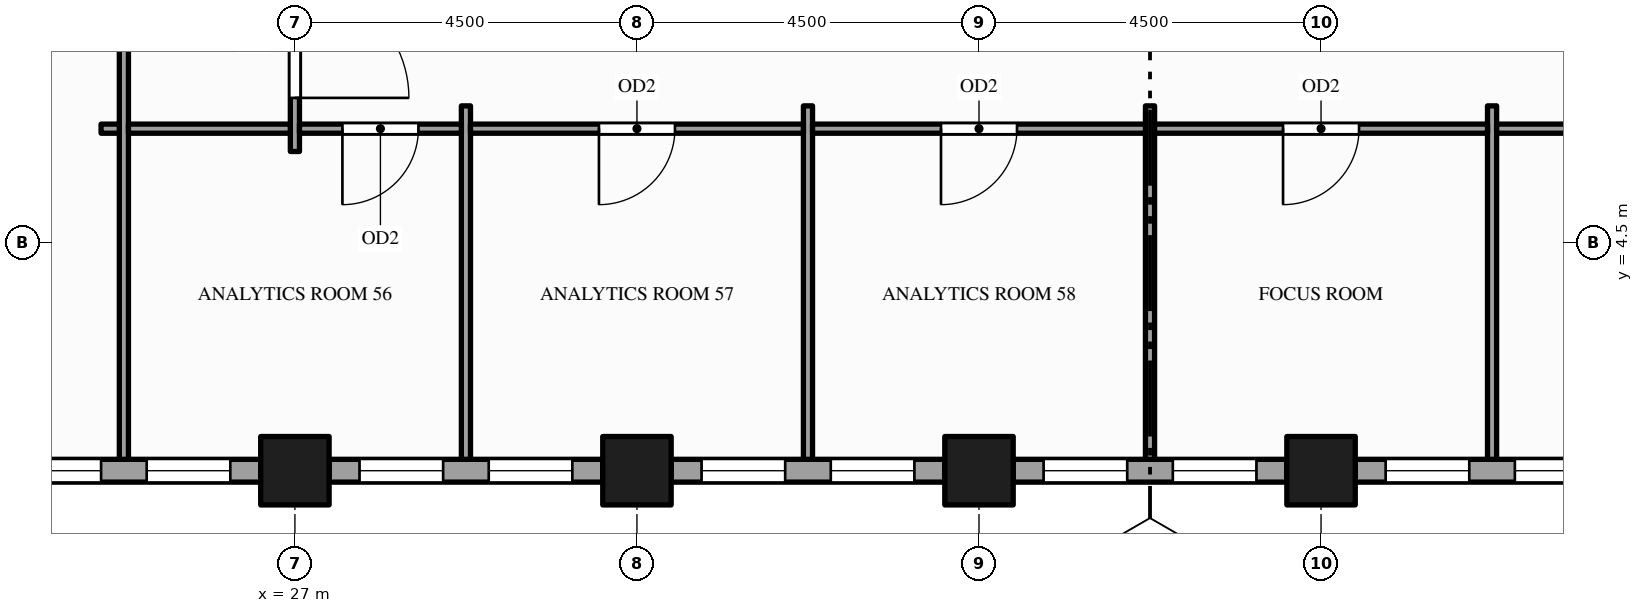
"""IFC4 building model, lengths in metres.
Left out: names, types, materials, properties, quantities, classifications, styles, units other than length and angle.
Written with IfcOpenShell. Run it as: python <this file> out.ifc"""

import sys

from ifc_helpers import new_model, si_unit, direction, frame, frame_2d, origin, origin_2d, place, context, subcontext, project, spatial, rectangle, hollow_rectangle, extrude, element, fill, save


model = new_model("IFC4")
c1 = context("Model", 3, precision=1e-05, world=origin(), true_north=direction((0.0, 1.0)))
c2 = subcontext(c1, "Body", "Model", "MODEL_VIEW")
j1 = project(units=[si_unit("LENGTHUNIT", "METRE"), si_unit("PLANEANGLEUNIT", "RADIAN")], contexts=[c1])
p1 = place(None, origin())
s1 = spatial("IfcSite", under=j1, at=p1, CompositionType="ELEMENT")
p2 = place(p1, origin())
s2 = spatial("IfcBuilding", under=s1, at=p2, CompositionType="ELEMENT")
p3 = place(p2, frame((0.0, 0.0, 159.0)))
s3 = spatial("IfcBuildingStorey", under=s2, at=p3, CompositionType="ELEMENT", Elevation=159.0)
for number, where, z_axis, x_axis in (
    (1, (27.0, 1.5, -0.15), (0.0, 0.0, 1.0), (1.0, 0.0, 0.0)),
    (2, (31.5, 1.5, -0.15), (0.0, 0.0, 1.0), (1.0, 0.0, 0.0)),
    (3, (36.0, 1.5, -0.15), (0.0, 0.0, 1.0), (1.0, 0.0, 0.0)),
    (4, (40.5, 1.5, -0.15), (0.0, 0.0, 1.0), (1.0, 0.0, 0.0)),
):
    element("IfcColumn", number, at=place(p3, frame(where, z_axis=z_axis, x_axis=x_axis)), inside=s3, PredefinedType="COLUMN", context=c2, shape_type="SweptSolid", body=[
        extrude(hollow_rectangle(XDim=0.9, YDim=0.9, WallThickness=0.045, at=origin_2d()), origin(), (0.0, 0.0, 1.0), 4.0),
    ])
p4 = place(p3, frame((22.95, 1.5, 0.0), z_axis=(0.0, 0.0, 1.0), x_axis=(1.0, 0.0, 0.0)))
e5 = element("IfcWall", 5, at=p4, inside=s3, PredefinedType="STANDARD", context=c2, shape_type="SweptSolid", body=[
    extrude(rectangle(XDim=3.6, YDim=0.3, at=frame_2d((1.8, 0.0))), origin(), (0.0, 0.0, 1.0), 2.87),
])
p5 = place(p4, frame((0.4, 0.0, 0.9)))
e6 = element("IfcOpeningElement", 6, at=p5, cuts=e5, PredefinedType="OPENING", context=c2, shape_type="SweptSolid", body=[
    extrude(rectangle(XDim=1.1, YDim=1.75, at=frame_2d((0.55, 0.875))), frame((0.0, 0.16, 0.0), z_axis=(0.0, -1.0, 0.0), x_axis=(1.0, 0.0, 0.0)), (0.0, 0.0, 1.0), 0.32),
])
p6 = place(p4, frame((2.1, 0.0, 0.9)))
e7 = element("IfcOpeningElement", 7, at=p6, cuts=e5, PredefinedType="OPENING", context=c2, shape_type="SweptSolid", body=[
    extrude(rectangle(XDim=1.1, YDim=1.75, at=frame_2d((0.55, 0.875))), frame((0.0, 0.16, 0.0), z_axis=(0.0, -1.0, 0.0), x_axis=(1.0, 0.0, 0.0)), (0.0, 0.0, 1.0), 0.32),
])
p7 = place(p3, frame((27.45, 1.5, 0.0), z_axis=(0.0, 0.0, 1.0), x_axis=(1.0, 0.0, 0.0)))
e8 = element("IfcWall", 8, at=p7, inside=s3, PredefinedType="STANDARD", context=c2, shape_type="SweptSolid", body=[
    extrude(rectangle(XDim=3.6, YDim=0.3, at=frame_2d((1.8, 0.0))), origin(), (0.0, 0.0, 1.0), 2.87),
])
p8 = place(p7, frame((0.4, 0.0, 0.9)))
e9 = element("IfcOpeningElement", 9, at=p8, cuts=e8, PredefinedType="OPENING", context=c2, shape_type="SweptSolid", body=[
    extrude(rectangle(XDim=1.1, YDim=1.75, at=frame_2d((0.55, 0.875))), frame((0.0, 0.16, 0.0), z_axis=(0.0, -1.0, 0.0), x_axis=(1.0, 0.0, 0.0)), (0.0, 0.0, 1.0), 0.32),
])
p9 = place(p7, frame((2.1, 0.0, 0.9)))
e10 = element("IfcOpeningElement", 10, at=p9, cuts=e8, PredefinedType="OPENING", context=c2, shape_type="SweptSolid", body=[
    extrude(rectangle(XDim=1.1, YDim=1.75, at=frame_2d((0.55, 0.875))), frame((0.0, 0.16, 0.0), z_axis=(0.0, -1.0, 0.0), x_axis=(1.0, 0.0, 0.0)), (0.0, 0.0, 1.0), 0.32),
])
p10 = place(p3, frame((31.95, 1.5, 0.0), z_axis=(0.0, 0.0, 1.0), x_axis=(1.0, 0.0, 0.0)))
e11 = element("IfcWall", 11, at=p10, inside=s3, PredefinedType="STANDARD", context=c2, shape_type="SweptSolid", body=[
    extrude(rectangle(XDim=3.6, YDim=0.3, at=frame_2d((1.8, 0.0))), origin(), (0.0, 0.0, 1.0), 2.87),
])
p11 = place(p10, frame((0.4, 0.0, 0.9)))
e12 = element("IfcOpeningElement", 12, at=p11, cuts=e11, PredefinedType="OPENING", context=c2, shape_type="SweptSolid", body=[
    extrude(rectangle(XDim=1.1, YDim=1.75, at=frame_2d((0.55, 0.875))), frame((0.0, 0.16, 0.0), z_axis=(0.0, -1.0, 0.0), x_axis=(1.0, 0.0, 0.0)), (0.0, 0.0, 1.0), 0.32),
])
p12 = place(p10, frame((2.1, 0.0, 0.9)))
e13 = element("IfcOpeningElement", 13, at=p12, cuts=e11, PredefinedType="OPENING", context=c2, shape_type="SweptSolid", body=[
    extrude(rectangle(XDim=1.1, YDim=1.75, at=frame_2d((0.55, 0.875))), frame((0.0, 0.16, 0.0), z_axis=(0.0, -1.0, 0.0), x_axis=(1.0, 0.0, 0.0)), (0.0, 0.0, 1.0), 0.32),
])
p13 = place(p3, frame((36.45, 1.5, 0.0), z_axis=(0.0, 0.0, 1.0), x_axis=(1.0, 0.0, 0.0)))
e14 = element("IfcWall", 14, at=p13, inside=s3, PredefinedType="STANDARD", context=c2, shape_type="SweptSolid", body=[
    extrude(rectangle(XDim=3.6, YDim=0.3, at=frame_2d((1.8, 0.0))), origin(), (0.0, 0.0, 1.0), 2.87),
])
p14 = place(p13, frame((0.4, 0.0, 0.9)))
e15 = element("IfcOpeningElement", 15, at=p14, cuts=e14, PredefinedType="OPENING", context=c2, shape_type="SweptSolid", body=[
    extrude(rectangle(XDim=1.1, YDim=1.75, at=frame_2d((0.55, 0.875))), frame((0.0, 0.16, 0.0), z_axis=(0.0, -1.0, 0.0), x_axis=(1.0, 0.0, 0.0)), (0.0, 0.0, 1.0), 0.32),
])
p15 = place(p13, frame((2.1, 0.0, 0.9)))
e16 = element("IfcOpeningElement", 16, at=p15, cuts=e14, PredefinedType="OPENING", context=c2, shape_type="SweptSolid", body=[
    extrude(rectangle(XDim=1.1, YDim=1.75, at=frame_2d((0.55, 0.875))), frame((0.0, 0.16, 0.0), z_axis=(0.0, -1.0, 0.0), x_axis=(1.0, 0.0, 0.0)), (0.0, 0.0, 1.0), 0.32),
])
p16 = place(p3, frame((40.95, 1.5, 0.0), z_axis=(0.0, 0.0, 1.0), x_axis=(1.0, 0.0, 0.0)))
e17 = element("IfcWall", 17, at=p16, inside=s3, PredefinedType="STANDARD", context=c2, shape_type="SweptSolid", body=[
    extrude(rectangle(XDim=3.6, YDim=0.3, at=frame_2d((1.8, 0.0))), origin(), (0.0, 0.0, 1.0), 2.87),
])
p17 = place(p16, frame((0.4, 0.0, 0.9)))
e18 = element("IfcOpeningElement", 18, at=p17, cuts=e17, PredefinedType="OPENING", context=c2, shape_type="SweptSolid", body=[
    extrude(rectangle(XDim=1.1, YDim=1.75, at=frame_2d((0.55, 0.875))), frame((0.0, 0.16, 0.0), z_axis=(0.0, -1.0, 0.0), x_axis=(1.0, 0.0, 0.0)), (0.0, 0.0, 1.0), 0.32),
])
p18 = place(p16, frame((2.1, 0.0, 0.9)))
e19 = element("IfcOpeningElement", 19, at=p18, cuts=e17, PredefinedType="OPENING", context=c2, shape_type="SweptSolid", body=[
    extrude(rectangle(XDim=1.1, YDim=1.75, at=frame_2d((0.55, 0.875))), frame((0.0, 0.16, 0.0), z_axis=(0.0, -1.0, 0.0), x_axis=(1.0, 0.0, 0.0)), (0.0, 0.0, 1.0), 0.32),
])
p19 = place(p3, frame((24.75, 1.65, 0.0), z_axis=(0.0, 0.0, 1.0), x_axis=(0.0, 1.0, 0.0)))
e20 = element("IfcWall", 20, at=p19, inside=s3, PredefinedType="PARTITIONING", context=c2, shape_type="SweptSolid", body=[
    extrude(rectangle(XDim=22.298, YDim=0.12, at=frame_2d((11.149, 0.0))), origin(), (0.0, 0.0, 1.0), 2.87),
])
p20 = place(p19, frame((7.725, 0.0, 0.0)))
e21 = element("IfcOpeningElement", 21, at=p20, cuts=e20, PredefinedType="OPENING", context=c2, shape_type="SweptSolid", body=[
    extrude(rectangle(XDim=1.5, YDim=2.1, at=frame_2d((0.75, 1.05))), frame((0.0, 0.07, 0.0), z_axis=(0.0, -1.0, 0.0), x_axis=(1.0, 0.0, 0.0)), (0.0, 0.0, 1.0), 0.14),
])
p21 = place(p19, frame((13.125, 0.0, 0.0)))
e22 = element("IfcOpeningElement", 22, at=p21, cuts=e20, PredefinedType="OPENING", context=c2, shape_type="SweptSolid", body=[
    extrude(rectangle(XDim=1.2, YDim=2.1, at=frame_2d((0.6, 1.05))), frame((0.0, 0.07, 0.0), z_axis=(0.0, -1.0, 0.0), x_axis=(1.0, 0.0, 0.0)), (0.0, 0.0, 1.0), 0.14),
])
p22 = place(p3, frame((27.0, 5.7, 0.0), z_axis=(0.0, 0.0, 1.0), x_axis=(0.0, 1.0, 0.0)))
e23 = element("IfcWall", 23, at=p22, inside=s3, PredefinedType="PARTITIONING", context=c2, shape_type="SweptSolid", body=[
    extrude(rectangle(XDim=14.1, YDim=0.12, at=frame_2d((7.05, 0.0))), origin(), (0.0, 0.0, 1.0), 2.87),
])
p23 = place(p22, frame((0.705, 0.0, 0.0)))
e24 = element("IfcOpeningElement", 24, at=p23, cuts=e23, PredefinedType="OPENING", context=c2, shape_type="SweptSolid", body=[
    extrude(rectangle(XDim=1.5, YDim=2.1, at=frame_2d((0.75, 1.05))), frame((0.0, 0.07, 0.0), z_axis=(0.0, -1.0, 0.0), x_axis=(1.0, 0.0, 0.0)), (0.0, 0.0, 1.0), 0.14),
])
p24 = place(p22, frame((11.895, 0.0, 0.0)))
e25 = element("IfcOpeningElement", 25, at=p24, cuts=e23, PredefinedType="OPENING", context=c2, shape_type="SweptSolid", body=[
    extrude(rectangle(XDim=1.5, YDim=2.1, at=frame_2d((0.75, 1.05))), frame((0.0, 0.07, 0.0), z_axis=(0.0, -1.0, 0.0), x_axis=(1.0, 0.0, 0.0)), (0.0, 0.0, 1.0), 0.14),
])
for number, where, z_axis, x_axis in (
    (26, (29.25, 1.65, 0.0), (0.0, 0.0, 1.0), (0.0, 1.0, 0.0)),
    (27, (33.75, 1.65, 0.0), (0.0, 0.0, 1.0), (0.0, 1.0, 0.0)),
    (28, (38.25, 1.65, 0.0), (0.0, 0.0, 1.0), (0.0, 1.0, 0.0)),
    (29, (42.75, 1.65, 0.0), (0.0, 0.0, 1.0), (0.0, 1.0, 0.0)),
):
    element("IfcWall", number, at=place(p3, frame(where, z_axis=z_axis, x_axis=x_axis)), inside=s3, PredefinedType="PARTITIONING", context=c2, shape_type="SweptSolid", body=[
        extrude(rectangle(XDim=4.65, YDim=0.12, at=frame_2d((2.325, 0.0))), origin(), (0.0, 0.0, 1.0), 2.87),
    ])
p25 = place(p3, frame((24.45, 6.0, 0.0), z_axis=(0.0, 0.0, 1.0), x_axis=(1.0, 0.0, 0.0)))
e30 = element("IfcWall", 30, at=p25, inside=s3, PredefinedType="PARTITIONING", context=c2, shape_type="SweptSolid", body=[
    extrude(rectangle(XDim=0.24, YDim=0.12, at=frame_2d((0.12, 0.0))), origin(), (0.0, 0.0, 1.0), 2.87),
])
p26 = place(p3, frame((24.81, 6.0, 0.0), z_axis=(0.0, 0.0, 1.0), x_axis=(1.0, 0.0, 0.0)))
e31 = element("IfcWall", 31, at=p26, inside=s3, PredefinedType="PARTITIONING", context=c2, shape_type="SweptSolid", body=[
    extrude(rectangle(XDim=2.13, YDim=0.12, at=frame_2d((1.065, 0.0))), origin(), (0.0, 0.0, 1.0), 2.87),
])
p27 = place(p3, frame((27.06, 6.0, 0.0), z_axis=(0.0, 0.0, 1.0), x_axis=(1.0, 0.0, 0.0)))
e32 = element("IfcWall", 32, at=p27, inside=s3, PredefinedType="PARTITIONING", context=c2, shape_type="SweptSolid", body=[
    extrude(rectangle(XDim=2.13, YDim=0.12, at=frame_2d((1.065, 0.0))), origin(), (0.0, 0.0, 1.0), 2.87),
])
p28 = place(p27, frame((0.565, 0.0, 0.0)))
e33 = element("IfcOpeningElement", 33, at=p28, cuts=e32, PredefinedType="OPENING", context=c2, shape_type="SweptSolid", body=[
    extrude(rectangle(XDim=1.0, YDim=2.1, at=frame_2d((0.5, 1.05))), frame((0.0, 0.07, 0.0), z_axis=(0.0, -1.0, 0.0), x_axis=(1.0, 0.0, 0.0)), (0.0, 0.0, 1.0), 0.14),
])
p29 = place(p3, frame((29.31, 6.0, 0.0), z_axis=(0.0, 0.0, 1.0), x_axis=(1.0, 0.0, 0.0)))
e34 = element("IfcWall", 34, at=p29, inside=s3, PredefinedType="PARTITIONING", context=c2, shape_type="SweptSolid", body=[
    extrude(rectangle(XDim=4.38, YDim=0.12, at=frame_2d((2.19, 0.0))), origin(), (0.0, 0.0, 1.0), 2.87),
])
p30 = place(p29, frame((1.69, 0.0, 0.0)))
e35 = element("IfcOpeningElement", 35, at=p30, cuts=e34, PredefinedType="OPENING", context=c2, shape_type="SweptSolid", body=[
    extrude(rectangle(XDim=1.0, YDim=2.1, at=frame_2d((0.5, 1.05))), frame((0.0, 0.07, 0.0), z_axis=(0.0, -1.0, 0.0), x_axis=(1.0, 0.0, 0.0)), (0.0, 0.0, 1.0), 0.14),
])
p31 = place(p3, frame((33.81, 6.0, 0.0), z_axis=(0.0, 0.0, 1.0), x_axis=(1.0, 0.0, 0.0)))
e36 = element("IfcWall", 36, at=p31, inside=s3, PredefinedType="PARTITIONING", context=c2, shape_type="SweptSolid", body=[
    extrude(rectangle(XDim=4.38, YDim=0.12, at=frame_2d((2.19, 0.0))), origin(), (0.0, 0.0, 1.0), 2.87),
])
p32 = place(p31, frame((1.69, 0.0, 0.0)))
e37 = element("IfcOpeningElement", 37, at=p32, cuts=e36, PredefinedType="OPENING", context=c2, shape_type="SweptSolid", body=[
    extrude(rectangle(XDim=1.0, YDim=2.1, at=frame_2d((0.5, 1.05))), frame((0.0, 0.07, 0.0), z_axis=(0.0, -1.0, 0.0), x_axis=(1.0, 0.0, 0.0)), (0.0, 0.0, 1.0), 0.14),
])
p33 = place(p3, frame((38.31, 6.0, 0.0), z_axis=(0.0, 0.0, 1.0), x_axis=(1.0, 0.0, 0.0)))
e38 = element("IfcWall", 38, at=p33, inside=s3, PredefinedType="PARTITIONING", context=c2, shape_type="SweptSolid", body=[
    extrude(rectangle(XDim=4.38, YDim=0.12, at=frame_2d((2.19, 0.0))), origin(), (0.0, 0.0, 1.0), 2.87),
])
p34 = place(p33, frame((1.69, 0.0, 0.0)))
e39 = element("IfcOpeningElement", 39, at=p34, cuts=e38, PredefinedType="OPENING", context=c2, shape_type="SweptSolid", body=[
    extrude(rectangle(XDim=1.0, YDim=2.1, at=frame_2d((0.5, 1.05))), frame((0.0, 0.07, 0.0), z_axis=(0.0, -1.0, 0.0), x_axis=(1.0, 0.0, 0.0)), (0.0, 0.0, 1.0), 0.14),
])
p35 = place(p3, frame((42.81, 6.0, 0.0), z_axis=(0.0, 0.0, 1.0), x_axis=(1.0, 0.0, 0.0)))
e40 = element("IfcWall", 40, at=p35, inside=s3, PredefinedType="PARTITIONING", context=c2, shape_type="SweptSolid", body=[
    extrude(rectangle(XDim=6.63, YDim=0.12, at=frame_2d((3.315, 0.0))), origin(), (0.0, 0.0, 1.0), 2.87),
])
p36 = place(p35, frame((2.715, 0.0, 0.0)))
e41 = element("IfcOpeningElement", 41, at=p36, cuts=e40, PredefinedType="OPENING", context=c2, shape_type="SweptSolid", body=[
    extrude(rectangle(XDim=1.2, YDim=2.1, at=frame_2d((0.6, 1.05))), frame((0.0, 0.07, 0.0), z_axis=(0.0, -1.0, 0.0), x_axis=(1.0, 0.0, 0.0)), (0.0, 0.0, 1.0), 0.14),
])
p37 = place(p5, origin())
e42 = element("IfcWindow", 42, at=p37, inside=s3, PartitioningType="SINGLE_PANEL", PredefinedType="WINDOW", context=c2, shape_type="SweptSolid", body=[
    extrude(rectangle(XDim=1.1, YDim=1.75, at=frame_2d((0.55, 0.875))), frame((0.0, 0.03, 0.0), z_axis=(0.0, -1.0, 0.0), x_axis=(1.0, 0.0, 0.0)), (0.0, 0.0, 1.0), 0.06),
])
fill(e6, e42)
p38 = place(p6, origin())
e43 = element("IfcWindow", 43, at=p38, inside=s3, PartitioningType="SINGLE_PANEL", PredefinedType="WINDOW", context=c2, shape_type="SweptSolid", body=[
    extrude(rectangle(XDim=1.1, YDim=1.75, at=frame_2d((0.55, 0.875))), frame((0.0, 0.03, 0.0), z_axis=(0.0, -1.0, 0.0), x_axis=(1.0, 0.0, 0.0)), (0.0, 0.0, 1.0), 0.06),
])
fill(e7, e43)
p39 = place(p8, origin())
e44 = element("IfcWindow", 44, at=p39, inside=s3, PartitioningType="SINGLE_PANEL", PredefinedType="WINDOW", context=c2, shape_type="SweptSolid", body=[
    extrude(rectangle(XDim=1.1, YDim=1.75, at=frame_2d((0.55, 0.875))), frame((0.0, 0.03, 0.0), z_axis=(0.0, -1.0, 0.0), x_axis=(1.0, 0.0, 0.0)), (0.0, 0.0, 1.0), 0.06),
])
fill(e9, e44)
p40 = place(p9, origin())
e45 = element("IfcWindow", 45, at=p40, inside=s3, PartitioningType="SINGLE_PANEL", PredefinedType="WINDOW", context=c2, shape_type="SweptSolid", body=[
    extrude(rectangle(XDim=1.1, YDim=1.75, at=frame_2d((0.55, 0.875))), frame((0.0, 0.03, 0.0), z_axis=(0.0, -1.0, 0.0), x_axis=(1.0, 0.0, 0.0)), (0.0, 0.0, 1.0), 0.06),
])
fill(e10, e45)
p41 = place(p11, origin())
e46 = element("IfcWindow", 46, at=p41, inside=s3, PartitioningType="SINGLE_PANEL", PredefinedType="WINDOW", context=c2, shape_type="SweptSolid", body=[
    extrude(rectangle(XDim=1.1, YDim=1.75, at=frame_2d((0.55, 0.875))), frame((0.0, 0.03, 0.0), z_axis=(0.0, -1.0, 0.0), x_axis=(1.0, 0.0, 0.0)), (0.0, 0.0, 1.0), 0.06),
])
fill(e12, e46)
p42 = place(p12, origin())
e47 = element("IfcWindow", 47, at=p42, inside=s3, PartitioningType="SINGLE_PANEL", PredefinedType="WINDOW", context=c2, shape_type="SweptSolid", body=[
    extrude(rectangle(XDim=1.1, YDim=1.75, at=frame_2d((0.55, 0.875))), frame((0.0, 0.03, 0.0), z_axis=(0.0, -1.0, 0.0), x_axis=(1.0, 0.0, 0.0)), (0.0, 0.0, 1.0), 0.06),
])
fill(e13, e47)
p43 = place(p14, origin())
e48 = element("IfcWindow", 48, at=p43, inside=s3, PartitioningType="SINGLE_PANEL", PredefinedType="WINDOW", context=c2, shape_type="SweptSolid", body=[
    extrude(rectangle(XDim=1.1, YDim=1.75, at=frame_2d((0.55, 0.875))), frame((0.0, 0.03, 0.0), z_axis=(0.0, -1.0, 0.0), x_axis=(1.0, 0.0, 0.0)), (0.0, 0.0, 1.0), 0.06),
])
fill(e15, e48)
p44 = place(p15, origin())
e49 = element("IfcWindow", 49, at=p44, inside=s3, PartitioningType="SINGLE_PANEL", PredefinedType="WINDOW", context=c2, shape_type="SweptSolid", body=[
    extrude(rectangle(XDim=1.1, YDim=1.75, at=frame_2d((0.55, 0.875))), frame((0.0, 0.03, 0.0), z_axis=(0.0, -1.0, 0.0), x_axis=(1.0, 0.0, 0.0)), (0.0, 0.0, 1.0), 0.06),
])
fill(e16, e49)
p45 = place(p17, origin())
e50 = element("IfcWindow", 50, at=p45, inside=s3, PartitioningType="SINGLE_PANEL", PredefinedType="WINDOW", context=c2, shape_type="SweptSolid", body=[
    extrude(rectangle(XDim=1.1, YDim=1.75, at=frame_2d((0.55, 0.875))), frame((0.0, 0.03, 0.0), z_axis=(0.0, -1.0, 0.0), x_axis=(1.0, 0.0, 0.0)), (0.0, 0.0, 1.0), 0.06),
])
fill(e18, e50)
p46 = place(p18, origin())
e51 = element("IfcWindow", 51, at=p46, inside=s3, PartitioningType="SINGLE_PANEL", PredefinedType="WINDOW", context=c2, shape_type="SweptSolid", body=[
    extrude(rectangle(XDim=1.1, YDim=1.75, at=frame_2d((0.55, 0.875))), frame((0.0, 0.03, 0.0), z_axis=(0.0, -1.0, 0.0), x_axis=(1.0, 0.0, 0.0)), (0.0, 0.0, 1.0), 0.06),
])
fill(e19, e51)
p47 = place(p23, origin())
e52 = element("IfcDoor", 52, at=p47, inside=s3, OperationType="SINGLE_SWING_LEFT", PredefinedType="DOOR", context=c2, shape_type="SweptSolid", body=[
    extrude(rectangle(XDim=1.5, YDim=2.1, at=frame_2d((0.75, 1.05))), frame((0.0, 0.025, 0.0), z_axis=(0.0, -1.0, 0.0), x_axis=(1.0, 0.0, 0.0)), (0.0, 0.0, 1.0), 0.05),
])
fill(e24, e52)
p48 = place(p28, origin())
e53 = element("IfcDoor", 53, at=p48, inside=s3, OperationType="SINGLE_SWING_LEFT", PredefinedType="DOOR", context=c2, shape_type="SweptSolid", body=[
    extrude(rectangle(XDim=1.0, YDim=2.1, at=frame_2d((0.5, 1.05))), frame((0.0, 0.025, 0.0), z_axis=(0.0, -1.0, 0.0), x_axis=(1.0, 0.0, 0.0)), (0.0, 0.0, 1.0), 0.05),
])
fill(e33, e53)
p49 = place(p30, origin())
e54 = element("IfcDoor", 54, at=p49, inside=s3, OperationType="SINGLE_SWING_LEFT", PredefinedType="DOOR", context=c2, shape_type="SweptSolid", body=[
    extrude(rectangle(XDim=1.0, YDim=2.1, at=frame_2d((0.5, 1.05))), frame((0.0, 0.025, 0.0), z_axis=(0.0, -1.0, 0.0), x_axis=(1.0, 0.0, 0.0)), (0.0, 0.0, 1.0), 0.05),
])
fill(e35, e54)
p50 = place(p32, origin())
e55 = element("IfcDoor", 55, at=p50, inside=s3, OperationType="SINGLE_SWING_LEFT", PredefinedType="DOOR", context=c2, shape_type="SweptSolid", body=[
    extrude(rectangle(XDim=1.0, YDim=2.1, at=frame_2d((0.5, 1.05))), frame((0.0, 0.025, 0.0), z_axis=(0.0, -1.0, 0.0), x_axis=(1.0, 0.0, 0.0)), (0.0, 0.0, 1.0), 0.05),
])
fill(e37, e55)
p51 = place(p34, origin())
e56 = element("IfcDoor", 56, at=p51, inside=s3, OperationType="SINGLE_SWING_LEFT", PredefinedType="DOOR", context=c2, shape_type="SweptSolid", body=[
    extrude(rectangle(XDim=1.0, YDim=2.1, at=frame_2d((0.5, 1.05))), frame((0.0, 0.025, 0.0), z_axis=(0.0, -1.0, 0.0), x_axis=(1.0, 0.0, 0.0)), (0.0, 0.0, 1.0), 0.05),
])
fill(e39, e56)
save(model, sys.argv[1])
